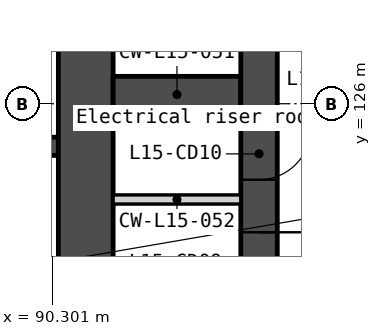
"""IFC4 building model, lengths in metres.
Left out: names, types, materials, properties, quantities, classifications, styles, units other than length and angle.
Written with IfcOpenShell. Run it as: python <this file> out.ifc"""

import sys

from ifc_helpers import new_model, si_unit, direction, frame, frame_2d, origin, place, context, subcontext, project, spatial, polyline, rectangle, outline, extrude, element, fill, save


model = new_model("IFC4")
c1 = context("Model", 3, precision=1e-05, world=origin(), true_north=direction((0.0, 1.0)))
c2 = subcontext(c1, "Body", "Model", "MODEL_VIEW")
j1 = project(units=[si_unit("LENGTHUNIT", "METRE"), si_unit("PLANEANGLEUNIT", "RADIAN")], contexts=[c1])
p1 = place(None, origin())
s1 = spatial("IfcSite", under=j1, at=p1, CompositionType="ELEMENT")
p2 = place(p1, origin())
s2 = spatial("IfcBuilding", under=s1, at=p2, CompositionType="ELEMENT")
p3 = place(p2, frame((0.0, 0.0, 66.5)))
s3 = spatial("IfcBuildingStorey", under=s2, at=p3, CompositionType="ELEMENT", Elevation=66.5)
p4 = place(p3, frame((87.85, 125.3, 0.0), z_axis=(0.0, 0.0, 1.0), x_axis=(1.0, 0.0, 0.0)))
e1 = element("IfcWall", 1, at=p4, inside=s3, PredefinedType="SOLIDWALL", context=c2, shape_type="SweptSolid", body=[
    extrude(rectangle(XDim=2.55, YDim=0.3, at=frame_2d((1.275, 0.0))), origin(), (0.0, 0.0, 1.0), 3.35),
])
p5 = place(p3, frame((90.85, 133.95, 0.0), z_axis=(0.0, 0.0, 1.0), x_axis=(0.0, -1.0, 0.0)))
e2 = element("IfcWall", 2, at=p5, inside=s3, PredefinedType="SOLIDWALL", context=c2, shape_type="SweptSolid", body=[
    extrude(rectangle(XDim=11.7, YDim=0.9, at=frame_2d((5.85, 0.0))), origin(), (0.0, 0.0, 1.0), 3.35),
])
p6 = place(p3, frame((91.3, 126.15, 0.0), z_axis=(0.0, 0.0, 1.0), x_axis=(1.0, 0.0, 0.0)))
e3 = element("IfcWall", 3, at=p6, inside=s3, PredefinedType="SOLIDWALL", context=c2, shape_type="SweptSolid", body=[
    extrude(rectangle(XDim=2.1, YDim=0.6, at=frame_2d((1.05, 0.0))), origin(), (0.0, 0.0, 1.0), 3.35),
])
p7 = place(p3, frame((91.3, 124.425, 0.0), z_axis=(0.0, 0.0, 1.0), x_axis=(1.0, 0.0, 0.0)))
e4 = element("IfcWall", 4, at=p7, inside=s3, PredefinedType="PARTITIONING", context=c2, shape_type="SweptSolid", body=[
    extrude(rectangle(XDim=2.1, YDim=0.15, at=frame_2d((1.05, 0.0))), origin(), (0.0, 0.0, 1.0), 3.35),
])
p8 = place(p3, frame((93.7, 133.95, 0.0), z_axis=(0.0, 0.0, 1.0), x_axis=(0.0, -1.0, 0.0)))
e5 = element("IfcWall", 5, at=p8, inside=s3, PredefinedType="SOLIDWALL", context=c2, shape_type="SweptSolid", body=[
    extrude(rectangle(XDim=13.8, YDim=0.6, at=frame_2d((6.9, 0.0))), origin(), (0.0, 0.0, 1.0), 3.35),
])
p9 = place(p8, frame((0.6, 0.0, 0.0)))
e6 = element("IfcOpeningElement", 6, at=p9, cuts=e5, PredefinedType="OPENING", context=c2, shape_type="SweptSolid", body=[
    extrude(rectangle(XDim=1.1, YDim=2.1, at=frame_2d((0.55, 1.05))), frame((0.0, 0.31, 0.0), z_axis=(0.0, -1.0, 0.0), x_axis=(1.0, 0.0, 0.0)), (0.0, 0.0, 1.0), 0.62),
])
p10 = place(p8, frame((10.064, 0.0, 0.0)))
e7 = element("IfcOpeningElement", 7, at=p10, cuts=e5, PredefinedType="OPENING", context=c2, shape_type="SweptSolid", body=[
    extrude(rectangle(XDim=1.0, YDim=2.1, at=frame_2d((0.5, 1.05))), frame((0.0, 0.31, 0.0), z_axis=(0.0, -1.0, 0.0), x_axis=(1.0, 0.0, 0.0)), (0.0, 0.0, 1.0), 0.62),
])
p11 = place(p8, frame((8.35, 0.0, 0.0)))
e8 = element("IfcOpeningElement", 8, at=p11, cuts=e5, PredefinedType="OPENING", context=c2, shape_type="SweptSolid", body=[
    extrude(rectangle(XDim=0.85, YDim=2.1, at=frame_2d((0.425, 1.05))), frame((0.0, 0.31, 0.0), z_axis=(0.0, -1.0, 0.0), x_axis=(1.0, 0.0, 0.0)), (0.0, 0.0, 1.0), 0.62),
])
p12 = place(p8, frame((12.239, 0.0, 0.0)))
e9 = element("IfcOpeningElement", 9, at=p12, cuts=e5, PredefinedType="OPENING", context=c2, shape_type="SweptSolid", body=[
    extrude(rectangle(XDim=1.0, YDim=2.1, at=frame_2d((0.5, 1.05))), frame((0.0, 0.31, 0.0), z_axis=(0.0, -1.0, 0.0), x_axis=(1.0, 0.0, 0.0)), (0.0, 0.0, 1.0), 0.62),
])
p13 = place(p3, frame((88.435, 99.831, -0.15), z_axis=(0.0, 0.0, 1.0), x_axis=(0.500000806382, 0.866024938219, 0.0)))
e10 = element("IfcWall", 10, at=p13, inside=s3, PredefinedType="SOLIDWALL", context=c2, shape_type="SweptSolid", body=[
    extrude(outline(polyline([(34.14, 3.5), (34.14, 0.0), (0.0, 0.0), (0.0, 3.5), (34.14, 3.5)])), frame((0.0, 0.225, 0.0), z_axis=(0.0, -1.0, 0.0), x_axis=(1.0, 0.0, 0.0)), (0.0, 0.0, 1.0), 0.45),
])
p14 = place(p13, frame((5.81, 0.0, 1.05)))
e11 = element("IfcOpeningElement", 11, at=p14, cuts=e10, PredefinedType="OPENING", context=c2, shape_type="SweptSolid", body=[
    extrude(rectangle(XDim=1.2, YDim=1.5, at=frame_2d((0.6, 0.75))), frame((0.0, 0.235, 0.0), z_axis=(0.0, -1.0, 0.0), x_axis=(1.0, 0.0, 0.0)), (0.0, 0.0, 1.0), 0.47),
])
p15 = place(p13, frame((7.51, 0.0, 1.05)))
e12 = element("IfcOpeningElement", 12, at=p15, cuts=e10, PredefinedType="OPENING", context=c2, shape_type="SweptSolid", body=[
    extrude(rectangle(XDim=1.2, YDim=1.5, at=frame_2d((0.6, 0.75))), frame((0.0, 0.235, 0.0), z_axis=(0.0, -1.0, 0.0), x_axis=(1.0, 0.0, 0.0)), (0.0, 0.0, 1.0), 0.47),
])
p16 = place(p13, frame((14.77, 0.0, 1.05)))
e13 = element("IfcOpeningElement", 13, at=p16, cuts=e10, PredefinedType="OPENING", context=c2, shape_type="SweptSolid", body=[
    extrude(rectangle(XDim=1.2, YDim=1.5, at=frame_2d((0.6, 0.75))), frame((0.0, 0.235, 0.0), z_axis=(0.0, -1.0, 0.0), x_axis=(1.0, 0.0, 0.0)), (0.0, 0.0, 1.0), 0.47),
])
p17 = place(p13, frame((16.47, 0.0, 1.05)))
e14 = element("IfcOpeningElement", 14, at=p17, cuts=e10, PredefinedType="OPENING", context=c2, shape_type="SweptSolid", body=[
    extrude(rectangle(XDim=1.2, YDim=1.5, at=frame_2d((0.6, 0.75))), frame((0.0, 0.235, 0.0), z_axis=(0.0, -1.0, 0.0), x_axis=(1.0, 0.0, 0.0)), (0.0, 0.0, 1.0), 0.47),
])
p18 = place(p13, frame((23.73, 0.0, 1.05)))
e15 = element("IfcOpeningElement", 15, at=p18, cuts=e10, PredefinedType="OPENING", context=c2, shape_type="SweptSolid", body=[
    extrude(rectangle(XDim=1.2, YDim=1.5, at=frame_2d((0.6, 0.75))), frame((0.0, 0.235, 0.0), z_axis=(0.0, -1.0, 0.0), x_axis=(1.0, 0.0, 0.0)), (0.0, 0.0, 1.0), 0.47),
])
p19 = place(p13, frame((25.43, 0.0, 1.05)))
e16 = element("IfcOpeningElement", 16, at=p19, cuts=e10, PredefinedType="OPENING", context=c2, shape_type="SweptSolid", body=[
    extrude(rectangle(XDim=1.2, YDim=1.5, at=frame_2d((0.6, 0.75))), frame((0.0, 0.235, 0.0), z_axis=(0.0, -1.0, 0.0), x_axis=(1.0, 0.0, 0.0)), (0.0, 0.0, 1.0), 0.47),
])
p20 = place(p13, frame((32.218, 0.0, 1.05)))
e17 = element("IfcOpeningElement", 17, at=p20, cuts=e10, PredefinedType="OPENING", context=c2, shape_type="SweptSolid", body=[
    extrude(rectangle(XDim=1.2, YDim=1.5, at=frame_2d((0.6, 0.75))), frame((0.0, 0.235, 0.0), z_axis=(0.0, -1.0, 0.0), x_axis=(1.0, 0.0, 0.0)), (0.0, 0.0, 1.0), 0.47),
])
p21 = place(p10, origin())
e18 = element("IfcDoor", 18, at=p21, inside=s3, OperationType="SINGLE_SWING_LEFT", PredefinedType="DOOR", context=c2, shape_type="SweptSolid", body=[
    extrude(rectangle(XDim=1.0, YDim=2.1, at=frame_2d((0.5, 1.05))), frame((0.0, 0.025, 0.0), z_axis=(0.0, -1.0, 0.0), x_axis=(1.0, 0.0, 0.0)), (0.0, 0.0, 1.0), 0.05),
])
fill(e7, e18)
p22 = place(p11, origin())
e19 = element("IfcDoor", 19, at=p22, inside=s3, OperationType="SINGLE_SWING_LEFT", PredefinedType="DOOR", context=c2, shape_type="SweptSolid", body=[
    extrude(rectangle(XDim=0.85, YDim=2.1, at=frame_2d((0.425, 1.05))), frame((0.0, 0.025, 0.0), z_axis=(0.0, -1.0, 0.0), x_axis=(1.0, 0.0, 0.0)), (0.0, 0.0, 1.0), 0.05),
])
fill(e8, e19)
save(model, sys.argv[1])
